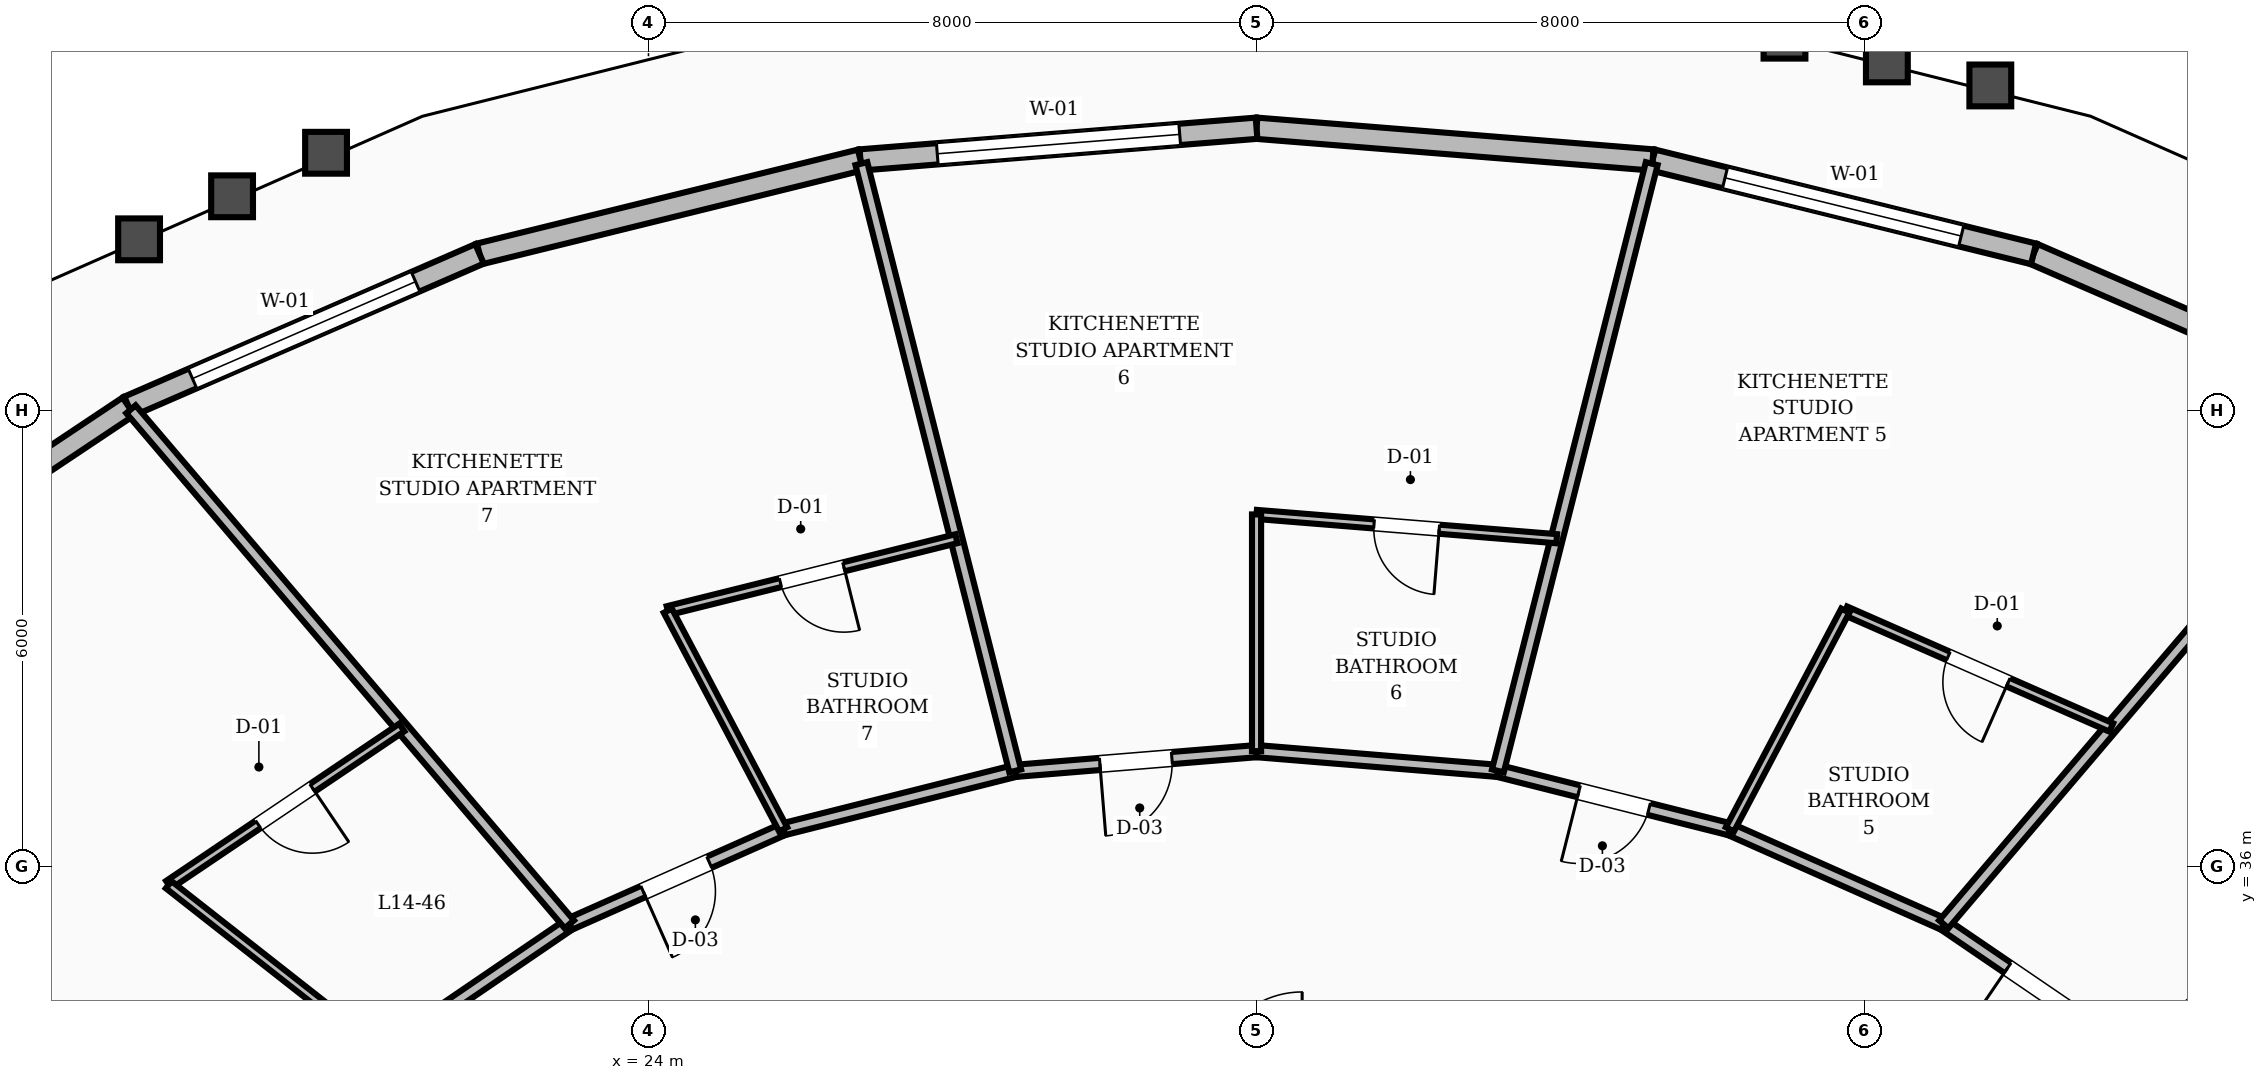
"""IFC4 building model, lengths in metres.
Left out: names, types, materials, properties, quantities, classifications, styles, units other than length and angle.
Written with IfcOpenShell. Run it as: python <this file> out.ifc"""

import sys

from ifc_helpers import new_model, si_unit, direction, frame, frame_2d, origin, place, context, subcontext, project, spatial, rectangle, extrude, element, fill, save


model = new_model("IFC4")
c1 = context("Model", 3, precision=1e-05, world=origin(), true_north=direction((0.0, 1.0)))
c2 = subcontext(c1, "Body", "Model", "MODEL_VIEW")
j1 = project(units=[si_unit("LENGTHUNIT", "METRE"), si_unit("PLANEANGLEUNIT", "RADIAN")], contexts=[c1])
p1 = place(None, origin())
s1 = spatial("IfcSite", under=j1, at=p1, CompositionType="ELEMENT")
p2 = place(p1, origin())
s2 = spatial("IfcBuilding", under=s1, at=p2, CompositionType="ELEMENT")
p3 = place(p2, frame((0.0, 0.0, 59.2)))
s3 = spatial("IfcBuildingStorey", under=s2, at=p3, CompositionType="ELEMENT", Elevation=59.2)
p4 = place(p3, frame((46.841, 42.053, 0.0), z_axis=(0.0, 0.0, 1.0), x_axis=(-0.917190263452, 0.398449520804, 0.0)))
e1 = element("IfcWall", 1, at=p4, inside=s3, PredefinedType="STANDARD", context=c2, shape_type="SweptSolid", body=[
    extrude(rectangle(XDim=5.035, YDim=0.28, at=frame_2d((2.518, 0.0))), origin(), (0.0, 0.0, 1.0), 2.65),
])
p5 = place(p3, frame((42.222, 44.06, 0.0), z_axis=(0.0, 0.0, 1.0), x_axis=(-0.970919369657, 0.239406720089, 0.0)))
e2 = element("IfcWall", 2, at=p5, inside=s3, PredefinedType="STANDARD", context=c2, shape_type="SweptSolid", body=[
    extrude(rectangle(XDim=5.161, YDim=0.28, at=frame_2d((2.581, 0.0))), origin(), (0.0, 0.0, 1.0), 2.65),
])
p6 = place(p5, frame((0.981, 0.0, 0.8)))
e3 = element("IfcOpeningElement", 3, at=p6, cuts=e2, PredefinedType="OPENING", context=c2, shape_type="SweptSolid", body=[
    extrude(rectangle(XDim=3.2, YDim=1.65, at=frame_2d((1.6, 0.825))), frame((0.0, 0.15, 0.0), z_axis=(0.0, -1.0, 0.0), x_axis=(1.0, 0.0, 0.0)), (0.0, 0.0, 1.0), 0.3),
])
p7 = place(p3, frame((37.211, 45.295, 0.0), z_axis=(0.0, 0.0, 1.0), x_axis=(-0.996810376731, 0.079806471181, 0.0)))
e4 = element("IfcWall", 4, at=p7, inside=s3, PredefinedType="STANDARD", context=c2, shape_type="SweptSolid", body=[
    extrude(rectangle(XDim=5.228, YDim=0.28, at=frame_2d((2.614, 0.0))), origin(), (0.0, 0.0, 1.0), 2.65),
])
p8 = place(p3, frame((32.0, 45.713, 0.0), z_axis=(0.0, 0.0, 1.0), x_axis=(-0.996810376731, -0.079806471181, 0.0)))
e5 = element("IfcWall", 5, at=p8, inside=s3, PredefinedType="STANDARD", context=c2, shape_type="SweptSolid", body=[
    extrude(rectangle(XDim=5.228, YDim=0.28, at=frame_2d((2.614, 0.0))), origin(), (0.0, 0.0, 1.0), 2.65),
])
p9 = place(p8, frame((1.014, 0.0, 0.8)))
e6 = element("IfcOpeningElement", 6, at=p9, cuts=e5, PredefinedType="OPENING", context=c2, shape_type="SweptSolid", body=[
    extrude(rectangle(XDim=3.2, YDim=1.65, at=frame_2d((1.6, 0.825))), frame((0.0, 0.15, 0.0), z_axis=(0.0, -1.0, 0.0), x_axis=(1.0, 0.0, 0.0)), (0.0, 0.0, 1.0), 0.3),
])
p10 = place(p3, frame((26.789, 45.295, 0.0), z_axis=(0.0, 0.0, 1.0), x_axis=(-0.970919369657, -0.239406720089, 0.0)))
e7 = element("IfcWall", 7, at=p10, inside=s3, PredefinedType="STANDARD", context=c2, shape_type="SweptSolid", body=[
    extrude(rectangle(XDim=5.161, YDim=0.28, at=frame_2d((2.581, 0.0))), origin(), (0.0, 0.0, 1.0), 2.65),
])
p11 = place(p3, frame((21.778, 44.06, 0.0), z_axis=(0.0, 0.0, 1.0), x_axis=(-0.917190263452, -0.398449520804, 0.0)))
e8 = element("IfcWall", 8, at=p11, inside=s3, PredefinedType="STANDARD", context=c2, shape_type="SweptSolid", body=[
    extrude(rectangle(XDim=5.035, YDim=0.28, at=frame_2d((2.518, 0.0))), origin(), (0.0, 0.0, 1.0), 2.65),
])
p12 = place(p11, frame((0.918, 0.0, 0.8)))
e9 = element("IfcOpeningElement", 9, at=p12, cuts=e8, PredefinedType="OPENING", context=c2, shape_type="SweptSolid", body=[
    extrude(rectangle(XDim=3.2, YDim=1.65, at=frame_2d((1.6, 0.825))), frame((0.0, 0.15, 0.0), z_axis=(0.0, -1.0, 0.0), x_axis=(1.0, 0.0, 0.0)), (0.0, 0.0, 1.0), 0.3),
])
p13 = place(p3, frame((17.159, 42.053, 0.0), z_axis=(0.0, 0.0, 1.0), x_axis=(-0.83189587854, -0.5549317501, 0.0)))
e10 = element("IfcWall", 10, at=p13, inside=s3, PredefinedType="STANDARD", context=c2, shape_type="SweptSolid", body=[
    extrude(rectangle(XDim=4.866, YDim=0.28, at=frame_2d((2.433, 0.0))), origin(), (0.0, 0.0, 1.0), 2.65),
])
p14 = place(p3, frame((43.508, 33.559, 0.0), z_axis=(0.0, 0.0, 1.0), x_axis=(-0.826293096206, 0.56324037423, 0.0)))
e11 = element("IfcWall", 11, at=p14, inside=s3, PredefinedType="SOLIDWALL", context=c2, shape_type="SweptSolid", body=[
    extrude(rectangle(XDim=2.985, YDim=0.16, at=frame_2d((1.492, 0.0))), origin(), (0.0, 0.0, 1.0), 2.61),
])
p15 = place(p14, frame((1.017, 0.0, 0.0)))
e12 = element("IfcOpeningElement", 12, at=p15, cuts=e11, PredefinedType="OPENING", context=c2, shape_type="SweptSolid", body=[
    extrude(rectangle(XDim=0.95, YDim=2.1, at=frame_2d((0.475, 1.05))), frame((0.0, 0.09, 0.0), z_axis=(0.0, -1.0, 0.0), x_axis=(1.0, 0.0, 0.0)), (0.0, 0.0, 1.0), 0.18),
])
p16 = place(p3, frame((41.041, 35.24, 0.0), z_axis=(0.0, 0.0, 1.0), x_axis=(-0.913952123493, 0.405822024984, 0.0)))
e13 = element("IfcWall", 13, at=p16, inside=s3, PredefinedType="SOLIDWALL", context=c2, shape_type="SweptSolid", body=[
    extrude(rectangle(XDim=3.078, YDim=0.16, at=frame_2d((1.539, 0.0))), origin(), (0.0, 0.0, 1.0), 2.61),
])
p17 = place(p3, frame((38.228, 36.489, 0.0), z_axis=(0.0, 0.0, 1.0), x_axis=(-0.969689238064, 0.244341526521, 0.0)))
e14 = element("IfcWall", 14, at=p17, inside=s3, PredefinedType="SOLIDWALL", context=c2, shape_type="SweptSolid", body=[
    extrude(rectangle(XDim=3.148, YDim=0.16, at=frame_2d((1.574, 0.0))), origin(), (0.0, 0.0, 1.0), 2.61),
])
p18 = place(p17, frame((1.099, 0.0, 0.0)))
e15 = element("IfcOpeningElement", 15, at=p18, cuts=e14, PredefinedType="OPENING", context=c2, shape_type="SweptSolid", body=[
    extrude(rectangle(XDim=0.95, YDim=2.1, at=frame_2d((0.475, 1.05))), frame((0.0, 0.09, 0.0), z_axis=(0.0, -1.0, 0.0), x_axis=(1.0, 0.0, 0.0)), (0.0, 0.0, 1.0), 0.18),
])
p19 = place(p3, frame((35.175, 37.258, 0.0), z_axis=(0.0, 0.0, 1.0), x_axis=(-0.996669377538, 0.081548463373, 0.0)))
e16 = element("IfcWall", 16, at=p19, inside=s3, PredefinedType="SOLIDWALL", context=c2, shape_type="SweptSolid", body=[
    extrude(rectangle(XDim=3.185, YDim=0.16, at=frame_2d((1.593, 0.0))), origin(), (0.0, 0.0, 1.0), 2.61),
])
p20 = place(p3, frame((32.0, 37.518, 0.0), z_axis=(0.0, 0.0, 1.0), x_axis=(-0.996669377538, -0.081548463373, 0.0)))
e17 = element("IfcWall", 17, at=p20, inside=s3, PredefinedType="SOLIDWALL", context=c2, shape_type="SweptSolid", body=[
    extrude(rectangle(XDim=3.185, YDim=0.16, at=frame_2d((1.593, 0.0))), origin(), (0.0, 0.0, 1.0), 2.61),
])
p21 = place(p20, frame((1.118, 0.0, 0.0)))
e18 = element("IfcOpeningElement", 18, at=p21, cuts=e17, PredefinedType="OPENING", context=c2, shape_type="SweptSolid", body=[
    extrude(rectangle(XDim=0.95, YDim=2.1, at=frame_2d((0.475, 1.05))), frame((0.0, 0.09, 0.0), z_axis=(0.0, -1.0, 0.0), x_axis=(1.0, 0.0, 0.0)), (0.0, 0.0, 1.0), 0.18),
])
p22 = place(p3, frame((28.825, 37.258, 0.0), z_axis=(0.0, 0.0, 1.0), x_axis=(-0.969689238064, -0.244341526521, 0.0)))
e19 = element("IfcWall", 19, at=p22, inside=s3, PredefinedType="SOLIDWALL", context=c2, shape_type="SweptSolid", body=[
    extrude(rectangle(XDim=3.148, YDim=0.16, at=frame_2d((1.574, 0.0))), origin(), (0.0, 0.0, 1.0), 2.61),
])
p23 = place(p3, frame((25.772, 36.489, 0.0), z_axis=(0.0, 0.0, 1.0), x_axis=(-0.913952123493, -0.405822024984, 0.0)))
e20 = element("IfcWall", 20, at=p23, inside=s3, PredefinedType="SOLIDWALL", context=c2, shape_type="SweptSolid", body=[
    extrude(rectangle(XDim=3.078, YDim=0.16, at=frame_2d((1.539, 0.0))), origin(), (0.0, 0.0, 1.0), 2.61),
])
p24 = place(p23, frame((1.064, 0.0, 0.0)))
e21 = element("IfcOpeningElement", 21, at=p24, cuts=e20, PredefinedType="OPENING", context=c2, shape_type="SweptSolid", body=[
    extrude(rectangle(XDim=0.95, YDim=2.1, at=frame_2d((0.475, 1.05))), frame((0.0, 0.09, 0.0), z_axis=(0.0, -1.0, 0.0), x_axis=(1.0, 0.0, 0.0)), (0.0, 0.0, 1.0), 0.18),
])
p25 = place(p3, frame((22.959, 35.24, 0.0), z_axis=(0.0, 0.0, 1.0), x_axis=(-0.826293096206, -0.56324037423, 0.0)))
e22 = element("IfcWall", 22, at=p25, inside=s3, PredefinedType="SOLIDWALL", context=c2, shape_type="SweptSolid", body=[
    extrude(rectangle(XDim=2.985, YDim=0.16, at=frame_2d((1.492, 0.0))), origin(), (0.0, 0.0, 1.0), 2.61),
])
p26 = place(p3, frame((43.508, 33.559, 0.0), z_axis=(0.0, 0.0, 1.0), x_axis=(0.786586722527, 0.617479819868, 0.0)))
e23 = element("IfcWall", 23, at=p26, inside=s3, PredefinedType="PARTITIONING", context=c2, shape_type="SweptSolid", body=[
    extrude(rectangle(XDim=3.566, YDim=0.12, at=frame_2d((1.783, 0.0))), origin(), (0.0, 0.0, 1.0), 2.61),
])
p27 = place(p3, frame((41.041, 35.24, 0.0), z_axis=(0.0, 0.0, 1.0), x_axis=(0.648157225864, 0.761506540064, 0.0)))
e24 = element("IfcWall", 24, at=p27, inside=s3, PredefinedType="SOLIDWALL", context=c2, shape_type="SweptSolid", body=[
    extrude(rectangle(XDim=8.898, YDim=0.16, at=frame_2d((4.449, 0.0))), origin(), (0.0, 0.0, 1.0), 2.61),
])
p28 = place(p3, frame((43.245, 37.829, 0.0), z_axis=(0.0, 0.0, 1.0), x_axis=(-0.915586098947, 0.402121990712, 0.0)))
e25 = element("IfcWall", 25, at=p28, inside=s3, PredefinedType="PARTITIONING", context=c2, shape_type="SweptSolid", body=[
    extrude(rectangle(XDim=3.822, YDim=0.12, at=frame_2d((1.911, 0.0))), origin(), (0.0, 0.0, 1.0), 2.61),
])
p29 = place(p28, frame((1.481, 0.0, 0.0)))
e26 = element("IfcOpeningElement", 26, at=p29, cuts=e25, PredefinedType="OPENING", context=c2, shape_type="SweptSolid", body=[
    extrude(rectangle(XDim=0.86, YDim=2.1, at=frame_2d((0.43, 1.05))), frame((0.0, 0.07, 0.0), z_axis=(0.0, -1.0, 0.0), x_axis=(1.0, 0.0, 0.0)), (0.0, 0.0, 1.0), 0.14),
])
p30 = place(p3, frame((38.228, 36.489, 0.0), z_axis=(0.0, 0.0, 1.0), x_axis=(0.466680348687, 0.884426058045, 0.0)))
e27 = element("IfcWall", 27, at=p30, inside=s3, PredefinedType="PARTITIONING", context=c2, shape_type="SweptSolid", body=[
    extrude(rectangle(XDim=3.253, YDim=0.12, at=frame_2d((1.626, 0.0))), origin(), (0.0, 0.0, 1.0), 2.61),
])
p31 = place(p3, frame((35.175, 37.258, 0.0), z_axis=(0.0, 0.0, 1.0), x_axis=(0.24564316936, 0.969360321731, 0.0)))
e28 = element("IfcWall", 28, at=p31, inside=s3, PredefinedType="SOLIDWALL", context=c2, shape_type="SweptSolid", body=[
    extrude(rectangle(XDim=8.241, YDim=0.16, at=frame_2d((4.121, 0.0))), origin(), (0.0, 0.0, 1.0), 2.61),
])
p32 = place(p3, frame((35.949, 40.312, 0.0), z_axis=(0.0, 0.0, 1.0), x_axis=(-0.996740977856, 0.080668600223, 0.0)))
e29 = element("IfcWall", 29, at=p32, inside=s3, PredefinedType="PARTITIONING", context=c2, shape_type="SweptSolid", body=[
    extrude(rectangle(XDim=3.962, YDim=0.12, at=frame_2d((1.981, 0.0))), origin(), (0.0, 0.0, 1.0), 2.61),
])
p33 = place(p32, frame((1.551, 0.0, 0.0)))
e30 = element("IfcOpeningElement", 30, at=p33, cuts=e29, PredefinedType="OPENING", context=c2, shape_type="SweptSolid", body=[
    extrude(rectangle(XDim=0.86, YDim=2.1, at=frame_2d((0.43, 1.05))), frame((0.0, 0.07, 0.0), z_axis=(0.0, -1.0, 0.0), x_axis=(1.0, 0.0, 0.0)), (0.0, 0.0, 1.0), 0.14),
])
p34 = place(p3, frame((32.0, 37.518, 0.0), z_axis=(0.0, 0.0, 1.0), x_axis=(0.0, 1.0, 0.0)))
e31 = element("IfcWall", 31, at=p34, inside=s3, PredefinedType="PARTITIONING", context=c2, shape_type="SweptSolid", body=[
    extrude(rectangle(XDim=3.114, YDim=0.12, at=frame_2d((1.557, 0.0))), origin(), (0.0, 0.0, 1.0), 2.61),
])
p35 = place(p3, frame((28.825, 37.258, 0.0), z_axis=(0.0, 0.0, 1.0), x_axis=(-0.24564316936, 0.969360321731, 0.0)))
e32 = element("IfcWall", 32, at=p35, inside=s3, PredefinedType="SOLIDWALL", context=c2, shape_type="SweptSolid", body=[
    extrude(rectangle(XDim=8.241, YDim=0.16, at=frame_2d((4.121, 0.0))), origin(), (0.0, 0.0, 1.0), 2.61),
])
p36 = place(p3, frame((28.051, 40.312, 0.0), z_axis=(0.0, 0.0, 1.0), x_axis=(-0.970307417723, -0.24187499894, 0.0)))
e33 = element("IfcWall", 33, at=p36, inside=s3, PredefinedType="PARTITIONING", context=c2, shape_type="SweptSolid", body=[
    extrude(rectangle(XDim=3.913, YDim=0.12, at=frame_2d((1.957, 0.0))), origin(), (0.0, 0.0, 1.0), 2.61),
])
p37 = place(p36, frame((1.527, 0.0, 0.0)))
e34 = element("IfcOpeningElement", 34, at=p37, cuts=e33, PredefinedType="OPENING", context=c2, shape_type="SweptSolid", body=[
    extrude(rectangle(XDim=0.86, YDim=2.1, at=frame_2d((0.43, 1.05))), frame((0.0, 0.07, 0.0), z_axis=(0.0, -1.0, 0.0), x_axis=(1.0, 0.0, 0.0)), (0.0, 0.0, 1.0), 0.14),
])
p38 = place(p3, frame((25.772, 36.489, 0.0), z_axis=(0.0, 0.0, 1.0), x_axis=(-0.466680348687, 0.884426058045, 0.0)))
e35 = element("IfcWall", 35, at=p38, inside=s3, PredefinedType="PARTITIONING", context=c2, shape_type="SweptSolid", body=[
    extrude(rectangle(XDim=3.253, YDim=0.12, at=frame_2d((1.626, 0.0))), origin(), (0.0, 0.0, 1.0), 2.61),
])
p39 = place(p3, frame((22.959, 35.24, 0.0), z_axis=(0.0, 0.0, 1.0), x_axis=(-0.648157225864, 0.761506540064, 0.0)))
e36 = element("IfcWall", 36, at=p39, inside=s3, PredefinedType="SOLIDWALL", context=c2, shape_type="SweptSolid", body=[
    extrude(rectangle(XDim=8.898, YDim=0.16, at=frame_2d((4.449, 0.0))), origin(), (0.0, 0.0, 1.0), 2.61),
])
p40 = place(p3, frame((20.755, 37.829, 0.0), z_axis=(0.0, 0.0, 1.0), x_axis=(-0.829084222504, -0.559123735854, 0.0)))
e37 = element("IfcWall", 37, at=p40, inside=s3, PredefinedType="PARTITIONING", context=c2, shape_type="SweptSolid", body=[
    extrude(rectangle(XDim=3.7, YDim=0.12, at=frame_2d((1.85, 0.0))), origin(), (0.0, 0.0, 1.0), 2.61),
])
p41 = place(p40, frame((1.42, 0.0, 0.0)))
e38 = element("IfcOpeningElement", 38, at=p41, cuts=e37, PredefinedType="OPENING", context=c2, shape_type="SweptSolid", body=[
    extrude(rectangle(XDim=0.86, YDim=2.1, at=frame_2d((0.43, 1.05))), frame((0.0, 0.07, 0.0), z_axis=(0.0, -1.0, 0.0), x_axis=(1.0, 0.0, 0.0)), (0.0, 0.0, 1.0), 0.14),
])
p42 = place(p3, frame((20.492, 33.559, 0.0), z_axis=(0.0, 0.0, 1.0), x_axis=(-0.786586722527, 0.617479819868, 0.0)))
e39 = element("IfcWall", 39, at=p42, inside=s3, PredefinedType="PARTITIONING", context=c2, shape_type="SweptSolid", body=[
    extrude(rectangle(XDim=3.566, YDim=0.12, at=frame_2d((1.783, 0.0))), origin(), (0.0, 0.0, 1.0), 2.61),
])
p43 = place(p6, origin())
e40 = element("IfcWindow", 40, at=p43, inside=s3, PartitioningType="SINGLE_PANEL", PredefinedType="WINDOW", context=c2, shape_type="SweptSolid", body=[
    extrude(rectangle(XDim=3.2, YDim=1.65, at=frame_2d((1.6, 0.825))), frame((0.0, 0.03, 0.0), z_axis=(0.0, -1.0, 0.0), x_axis=(1.0, 0.0, 0.0)), (0.0, 0.0, 1.0), 0.06),
])
fill(e3, e40)
p44 = place(p9, origin())
e41 = element("IfcWindow", 41, at=p44, inside=s3, PartitioningType="SINGLE_PANEL", PredefinedType="WINDOW", context=c2, shape_type="SweptSolid", body=[
    extrude(rectangle(XDim=3.2, YDim=1.65, at=frame_2d((1.6, 0.825))), frame((0.0, 0.03, 0.0), z_axis=(0.0, -1.0, 0.0), x_axis=(1.0, 0.0, 0.0)), (0.0, 0.0, 1.0), 0.06),
])
fill(e6, e41)
p45 = place(p12, origin())
e42 = element("IfcWindow", 42, at=p45, inside=s3, PartitioningType="SINGLE_PANEL", PredefinedType="WINDOW", context=c2, shape_type="SweptSolid", body=[
    extrude(rectangle(XDim=3.2, YDim=1.65, at=frame_2d((1.6, 0.825))), frame((0.0, 0.03, 0.0), z_axis=(0.0, -1.0, 0.0), x_axis=(1.0, 0.0, 0.0)), (0.0, 0.0, 1.0), 0.06),
])
fill(e9, e42)
p46 = place(p15, origin())
e43 = element("IfcDoor", 43, at=p46, inside=s3, OperationType="SINGLE_SWING_RIGHT", PredefinedType="DOOR", context=c2, shape_type="SweptSolid", body=[
    extrude(rectangle(XDim=0.95, YDim=2.1, at=frame_2d((0.475, 1.05))), frame((0.0, 0.025, 0.0), z_axis=(0.0, -1.0, 0.0), x_axis=(1.0, 0.0, 0.0)), (0.0, 0.0, 1.0), 0.05),
])
fill(e12, e43)
p47 = place(p29, origin())
e44 = element("IfcDoor", 44, at=p47, inside=s3, OperationType="SINGLE_SWING_LEFT", PredefinedType="DOOR", context=c2, shape_type="SweptSolid", body=[
    extrude(rectangle(XDim=0.86, YDim=2.1, at=frame_2d((0.43, 1.05))), frame((0.0, 0.025, 0.0), z_axis=(0.0, -1.0, 0.0), x_axis=(1.0, 0.0, 0.0)), (0.0, 0.0, 1.0), 0.05),
])
fill(e26, e44)
p48 = place(p18, origin())
e45 = element("IfcDoor", 45, at=p48, inside=s3, OperationType="SINGLE_SWING_RIGHT", PredefinedType="DOOR", context=c2, shape_type="SweptSolid", body=[
    extrude(rectangle(XDim=0.95, YDim=2.1, at=frame_2d((0.475, 1.05))), frame((0.0, 0.025, 0.0), z_axis=(0.0, -1.0, 0.0), x_axis=(1.0, 0.0, 0.0)), (0.0, 0.0, 1.0), 0.05),
])
fill(e15, e45)
p49 = place(p33, origin())
e46 = element("IfcDoor", 46, at=p49, inside=s3, OperationType="SINGLE_SWING_LEFT", PredefinedType="DOOR", context=c2, shape_type="SweptSolid", body=[
    extrude(rectangle(XDim=0.86, YDim=2.1, at=frame_2d((0.43, 1.05))), frame((0.0, 0.025, 0.0), z_axis=(0.0, -1.0, 0.0), x_axis=(1.0, 0.0, 0.0)), (0.0, 0.0, 1.0), 0.05),
])
fill(e30, e46)
p50 = place(p21, origin())
e47 = element("IfcDoor", 47, at=p50, inside=s3, OperationType="SINGLE_SWING_RIGHT", PredefinedType="DOOR", context=c2, shape_type="SweptSolid", body=[
    extrude(rectangle(XDim=0.95, YDim=2.1, at=frame_2d((0.475, 1.05))), frame((0.0, 0.025, 0.0), z_axis=(0.0, -1.0, 0.0), x_axis=(1.0, 0.0, 0.0)), (0.0, 0.0, 1.0), 0.05),
])
fill(e18, e47)
p51 = place(p37, origin())
e48 = element("IfcDoor", 48, at=p51, inside=s3, OperationType="SINGLE_SWING_LEFT", PredefinedType="DOOR", context=c2, shape_type="SweptSolid", body=[
    extrude(rectangle(XDim=0.86, YDim=2.1, at=frame_2d((0.43, 1.05))), frame((0.0, 0.025, 0.0), z_axis=(0.0, -1.0, 0.0), x_axis=(1.0, 0.0, 0.0)), (0.0, 0.0, 1.0), 0.05),
])
fill(e34, e48)
p52 = place(p24, origin())
e49 = element("IfcDoor", 49, at=p52, inside=s3, OperationType="SINGLE_SWING_RIGHT", PredefinedType="DOOR", context=c2, shape_type="SweptSolid", body=[
    extrude(rectangle(XDim=0.95, YDim=2.1, at=frame_2d((0.475, 1.05))), frame((0.0, 0.025, 0.0), z_axis=(0.0, -1.0, 0.0), x_axis=(1.0, 0.0, 0.0)), (0.0, 0.0, 1.0), 0.05),
])
fill(e21, e49)
p53 = place(p41, origin())
e50 = element("IfcDoor", 50, at=p53, inside=s3, OperationType="SINGLE_SWING_LEFT", PredefinedType="DOOR", context=c2, shape_type="SweptSolid", body=[
    extrude(rectangle(XDim=0.86, YDim=2.1, at=frame_2d((0.43, 1.05))), frame((0.0, 0.025, 0.0), z_axis=(0.0, -1.0, 0.0), x_axis=(1.0, 0.0, 0.0)), (0.0, 0.0, 1.0), 0.05),
])
fill(e38, e50)
save(model, sys.argv[1])
